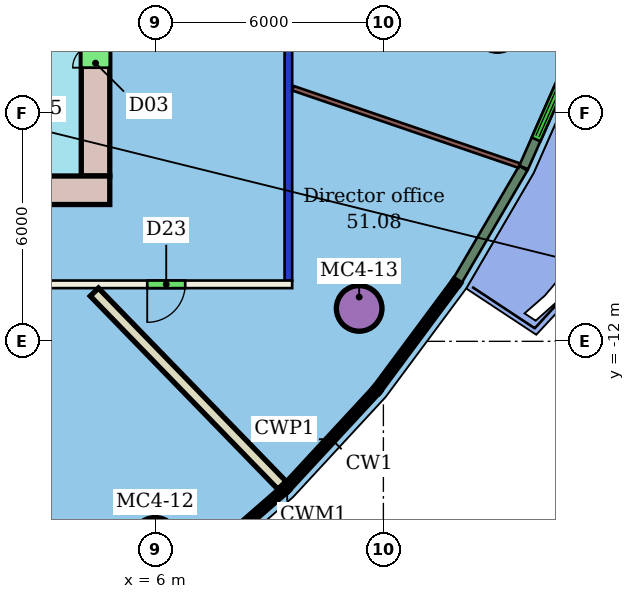
"""IFC4 building model, lengths in metres.
Left out: names, types, materials, properties, quantities, classifications, styles, units other than length and angle.
Written with IfcOpenShell. Run it as: python <this file> out.ifc"""

import sys

from ifc_helpers import new_model, si_unit, direction, frame, frame_2d, origin, origin_2d, place, context, subcontext, project, spatial, rectangle, hollow_circle, extrude, element, fill, save


model = new_model("IFC4")
c1 = context("Model", 3, precision=1e-05, world=origin(), true_north=direction((0.0, 1.0)))
c2 = subcontext(c1, "Body", "Model", "MODEL_VIEW")
j1 = project(units=[si_unit("LENGTHUNIT", "METRE"), si_unit("PLANEANGLEUNIT", "RADIAN")], contexts=[c1])
p1 = place(None, origin())
s1 = spatial("IfcSite", under=j1, at=p1, CompositionType="ELEMENT")
p2 = place(p1, origin())
s2 = spatial("IfcBuilding", under=s1, at=p2, CompositionType="ELEMENT")
p3 = place(p2, frame((0.0, 0.0, 210.1)))
s3 = spatial("IfcBuildingStorey", under=s2, at=p3, CompositionType="ELEMENT", Elevation=210.1)
for number, where, z_axis, x_axis in (
    (1, (5.993, -17.237, 0.0), (0.0, 0.0, 1.0), (1.0, 0.0, 0.0)),
    (2, (11.363, -11.134, 0.0), (0.0, 0.0, 1.0), (1.0, 0.0, 0.0)),
):
    element("IfcColumn", number, at=place(p3, frame(where, z_axis=z_axis, x_axis=x_axis)), inside=s3, PredefinedType="COLUMN", context=c2, shape_type="SweptSolid", body=[
        extrude(hollow_circle(Radius=0.6, WallThickness=0.045, at=origin_2d()), origin(), (0.0, 0.0, 1.0), 3.45),
    ])
p4 = place(p3, frame((9.6, -10.5, 0.0), z_axis=(0.0, 0.0, 1.0), x_axis=(-1.0, 0.0, 0.0)))
e3 = element("IfcWall", 3, at=p4, inside=s3, PredefinedType="PARTITIONING", context=c2, shape_type="SweptSolid", body=[
    extrude(rectangle(XDim=31.2, YDim=0.2, at=frame_2d((15.6, 0.0))), origin(), (0.0, 0.0, 1.0), 3.45),
])
p5 = place(p4, frame((21.96, 0.0, 0.0)))
e4 = element("IfcOpeningElement", 4, at=p5, cuts=e3, PredefinedType="OPENING", context=c2, shape_type="SweptSolid", body=[
    extrude(rectangle(XDim=0.9, YDim=2.1, at=frame_2d((0.45, 1.05))), frame((0.0, 0.11, 0.0), z_axis=(0.0, -1.0, 0.0), x_axis=(1.0, 0.0, 0.0)), (0.0, 0.0, 1.0), 0.22),
])
p6 = place(p4, frame((18.96, 0.0, 0.0)))
e5 = element("IfcOpeningElement", 5, at=p6, cuts=e3, PredefinedType="OPENING", context=c2, shape_type="SweptSolid", body=[
    extrude(rectangle(XDim=0.9, YDim=2.1, at=frame_2d((0.45, 1.05))), frame((0.0, 0.11, 0.0), z_axis=(0.0, -1.0, 0.0), x_axis=(1.0, 0.0, 0.0)), (0.0, 0.0, 1.0), 0.22),
])
p7 = place(p4, frame((8.428, 0.0, 0.0)))
e6 = element("IfcOpeningElement", 6, at=p7, cuts=e3, PredefinedType="OPENING", context=c2, shape_type="SweptSolid", body=[
    extrude(rectangle(XDim=1.8, YDim=2.4, at=frame_2d((0.9, 1.2))), frame((0.0, 0.11, 0.0), z_axis=(0.0, -1.0, 0.0), x_axis=(1.0, 0.0, 0.0)), (0.0, 0.0, 1.0), 0.22),
])
p8 = place(p4, frame((2.814, 0.0, 0.0)))
e7 = element("IfcOpeningElement", 7, at=p8, cuts=e3, PredefinedType="OPENING", context=c2, shape_type="SweptSolid", body=[
    extrude(rectangle(XDim=1.0, YDim=2.4, at=frame_2d((0.5, 1.2))), frame((0.0, 0.11, 0.0), z_axis=(0.0, -1.0, 0.0), x_axis=(1.0, 0.0, 0.0)), (0.0, 0.0, 1.0), 0.22),
])
p9 = place(p3, frame((9.5, 10.4, 0.0), z_axis=(0.0, 0.0, 1.0), x_axis=(0.0, -1.0, 0.0)))
e8 = element("IfcWall", 8, at=p9, inside=s3, PredefinedType="PARTITIONING", context=c2, shape_type="SweptSolid", body=[
    extrude(rectangle(XDim=20.8, YDim=0.2, at=frame_2d((10.4, 0.0))), origin(), (0.0, 0.0, 1.0), 3.05),
])
p10 = place(p9, frame((11.307, 0.0, 0.0)))
e9 = element("IfcOpeningElement", 9, at=p10, cuts=e8, PredefinedType="OPENING", context=c2, shape_type="SweptSolid", body=[
    extrude(rectangle(XDim=1.5, YDim=2.1, at=frame_2d((0.75, 1.05))), frame((0.0, 0.11, 0.0), z_axis=(0.0, -1.0, 0.0), x_axis=(1.0, 0.0, 0.0)), (0.0, 0.0, 1.0), 0.22),
])
p11 = place(p3, frame((9.332, -15.788, 0.0), z_axis=(0.0, 0.0, 1.0), x_axis=(-0.696678313938, 0.717383667843, 0.0)))
e10 = element("IfcWall", 10, at=p11, inside=s3, PredefinedType="PARTITIONING", context=c2, shape_type="SweptSolid", body=[
    extrude(rectangle(XDim=7.086, YDim=0.3, at=frame_2d((3.543, 0.0))), origin(), (0.0, 0.0, 1.0), 3.45),
])
p12 = place(p3, frame((15.576, -7.376, 0.0), z_axis=(0.0, 0.0, 1.0), x_axis=(-0.946227116855, 0.323503080863, 0.0)))
e11 = element("IfcWall", 11, at=p12, inside=s3, PredefinedType="PARTITIONING", context=c2, shape_type="SweptSolid", body=[
    extrude(rectangle(XDim=6.294, YDim=0.125, at=frame_2d((3.147, 0.0))), origin(), (0.0, 0.0, 1.0), 3.45),
])
p13 = place(p3, frame((13.956, -10.396, 0.0), z_axis=(0.0, 0.0, 1.0), x_axis=(0.504456760021, 0.863436956164, 0.0)))
e12 = element("IfcWall", 12, at=p13, inside=s3, PredefinedType="SOLIDWALL", context=c2, shape_type="SweptSolid", body=[
    extrude(rectangle(XDim=3.42, YDim=0.25, at=frame_2d((1.71, 0.0))), origin(), (0.0, 0.0, 1.0), 3.1),
])
p14 = place(p3, frame((15.691, -7.423, 0.0), z_axis=(0.0, 0.0, 1.0), x_axis=(0.404116447322, 0.914707547254, 0.0)))
e13 = element("IfcWall", 13, at=p14, inside=s3, PredefinedType="SOLIDWALL", context=c2, shape_type="SweptSolid", body=[
    extrude(rectangle(XDim=3.407, YDim=0.25, at=frame_2d((1.704, 0.0))), origin(), (0.0, 0.0, 1.0), 3.1),
])
p15 = place(p14, frame((0.804, 0.0, 0.0)))
e14 = element("IfcOpeningElement", 14, at=p15, cuts=e13, PredefinedType="OPENING", context=c2, shape_type="SweptSolid", body=[
    extrude(rectangle(XDim=1.8, YDim=2.4, at=frame_2d((0.9, 1.2))), frame((0.0, 0.135, 0.0), z_axis=(0.0, -1.0, 0.0), x_axis=(1.0, 0.0, 0.0)), (0.0, 0.0, 1.0), 0.27),
])
p16 = place(p3, frame((-16.8, -8.025, 0.0), z_axis=(0.0, 0.0, 1.0), x_axis=(1.0, 0.0, 0.0)))
e15 = element("IfcWall", 15, at=p16, inside=s3, PredefinedType="SHEAR", context=c2, shape_type="SweptSolid", body=[
    extrude(rectangle(XDim=21.6, YDim=0.75, at=frame_2d((10.8, 0.0))), origin(), (0.0, 0.0, 1.0), 3.3),
])
p17 = place(p16, frame((4.8, 0.0, 0.0)))
e16 = element("IfcOpeningElement", 16, at=p17, cuts=e15, PredefinedType="OPENING", context=c2, shape_type="SweptSolid", body=[
    extrude(rectangle(XDim=1.2, YDim=2.1, at=frame_2d((0.6, 1.05))), frame((0.0, 0.385, 0.0), z_axis=(0.0, -1.0, 0.0), x_axis=(1.0, 0.0, 0.0)), (0.0, 0.0, 1.0), 0.77),
])
p18 = place(p3, frame((4.425, -7.65, 0.0), z_axis=(0.0, 0.0, 1.0), x_axis=(0.0, 1.0, 0.0)))
e17 = element("IfcWall", 17, at=p18, inside=s3, PredefinedType="SHEAR", context=c2, shape_type="SweptSolid", body=[
    extrude(rectangle(XDim=15.3, YDim=0.75, at=frame_2d((7.65, 0.0))), origin(), (0.0, 0.0, 1.0), 3.3),
])
p19 = place(p18, frame((2.85, 0.0, 0.0)))
e18 = element("IfcOpeningElement", 18, at=p19, cuts=e17, PredefinedType="OPENING", context=c2, shape_type="SweptSolid", body=[
    extrude(rectangle(XDim=1.2, YDim=2.1, at=frame_2d((0.6, 1.05))), frame((0.0, 0.385, 0.0), z_axis=(0.0, -1.0, 0.0), x_axis=(1.0, 0.0, 0.0)), (0.0, 0.0, 1.0), 0.77),
])
p20 = place(p18, frame((11.25, 0.0, 0.0)))
e19 = element("IfcOpeningElement", 19, at=p20, cuts=e17, PredefinedType="OPENING", context=c2, shape_type="SweptSolid", body=[
    extrude(rectangle(XDim=1.2, YDim=2.1, at=frame_2d((0.6, 1.05))), frame((0.0, 0.385, 0.0), z_axis=(0.0, -1.0, 0.0), x_axis=(1.0, 0.0, 0.0)), (0.0, 0.0, 1.0), 0.77),
])
p21 = place(p8, origin())
e20 = element("IfcDoor", 20, at=p21, inside=s3, OperationType="SINGLE_SWING_RIGHT", PredefinedType="DOOR", context=c2, shape_type="SweptSolid", body=[
    extrude(rectangle(XDim=1.0, YDim=2.4, at=frame_2d((0.5, 1.2))), frame((0.0, 0.025, 0.0), z_axis=(0.0, -1.0, 0.0), x_axis=(1.0, 0.0, 0.0)), (0.0, 0.0, 1.0), 0.05),
])
fill(e7, e20)
p22 = place(p15, origin())
e21 = element("IfcDoor", 21, at=p22, inside=s3, OperationType="DOUBLE_DOOR_SLIDING", PredefinedType="DOOR", context=c2, shape_type="SweptSolid", body=[
    extrude(rectangle(XDim=1.8, YDim=2.4, at=frame_2d((0.9, 1.2))), frame((0.0, 0.025, 0.0), z_axis=(0.0, -1.0, 0.0), x_axis=(1.0, 0.0, 0.0)), (0.0, 0.0, 1.0), 0.05),
])
fill(e14, e21)
p23 = place(p19, origin())
e22 = element("IfcDoor", 22, at=p23, inside=s3, OperationType="DOUBLE_DOOR_SINGLE_SWING", PredefinedType="NOTDEFINED", context=c2, shape_type="SweptSolid", body=[
    extrude(rectangle(XDim=1.2, YDim=2.1, at=frame_2d((0.6, 1.05))), frame((0.0, 0.025, 0.0), z_axis=(0.0, -1.0, 0.0), x_axis=(1.0, 0.0, 0.0)), (0.0, 0.0, 1.0), 0.05),
])
fill(e18, e22)
save(model, sys.argv[1])
